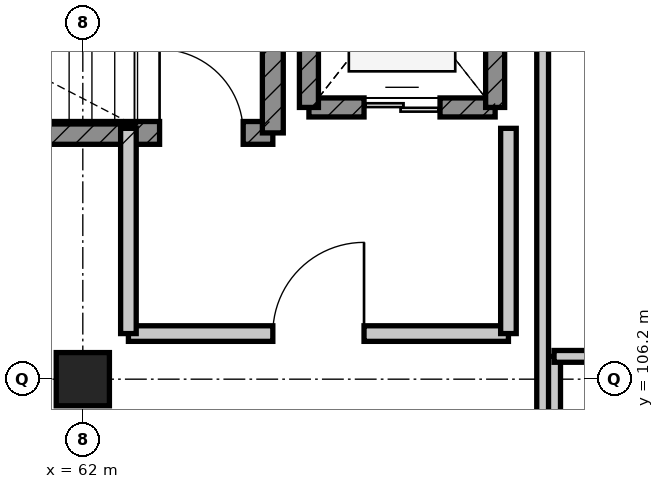
"""IFC4 building model, lengths in metres.
Left out: names, types, materials, properties, quantities, classifications, styles, units other than length and angle.
Written with IfcOpenShell. Run it as: python <this file> out.ifc"""

import sys

from ifc_helpers import new_model, si_unit, direction, frame, frame_2d, origin, origin_2d, place, context, subcontext, project, spatial, rectangle, extrude, element, fill, save


model = new_model("IFC4")
c1 = context("Model", 3, precision=1e-05, world=origin(), true_north=direction((0.0, 1.0)))
c2 = subcontext(c1, "Body", "Model", "MODEL_VIEW")
j1 = project(units=[si_unit("LENGTHUNIT", "METRE"), si_unit("PLANEANGLEUNIT", "RADIAN")], contexts=[c1])
p1 = place(None, origin())
s1 = spatial("IfcSite", under=j1, at=p1, CompositionType="ELEMENT")
p2 = place(p1, origin())
s2 = spatial("IfcBuilding", under=s1, at=p2, CompositionType="ELEMENT")
p3 = place(p2, frame((0.0, 0.0, 15.0)))
s3 = spatial("IfcBuildingStorey", under=s2, at=p3, CompositionType="ELEMENT", Elevation=15.0)
p4 = place(p3, frame((62.0, 106.2, 0.0), z_axis=(0.0, 0.0, 1.0), x_axis=(1.0, 0.0, 0.0)))
e1 = element("IfcColumn", 1, at=p4, inside=s3, PredefinedType="COLUMN", context=c2, shape_type="SweptSolid", body=[
    extrude(rectangle(XDim=0.7, YDim=0.7, at=origin_2d()), origin(), (0.0, 0.0, 1.0), 4.2),
])
p5 = place(p3, frame((56.1, 109.44, 0.0), z_axis=(0.0, 0.0, 1.0), x_axis=(1.0, 0.0, 0.0)))
e2 = element("IfcWall", 2, at=p5, inside=s3, PredefinedType="SHEAR", context=c2, shape_type="SweptSolid", body=[
    extrude(rectangle(XDim=8.4, YDim=0.3, at=frame_2d((4.2, 0.0))), origin(), (0.0, 0.0, 1.0), 3.94),
])
p6 = place(p5, frame((6.91, 0.0, 0.0)))
e3 = element("IfcOpeningElement", 3, at=p6, cuts=e2, PredefinedType="OPENING", context=c2, shape_type="SweptSolid", body=[
    extrude(rectangle(XDim=1.1, YDim=2.1, at=frame_2d((0.55, 1.05))), frame((0.0, 0.16, 0.0), z_axis=(0.0, -1.0, 0.0), x_axis=(1.0, 0.0, 0.0)), (0.0, 0.0, 1.0), 0.32),
])
p7 = place(p3, frame((64.5, 109.44, 0.0), z_axis=(0.0, 0.0, 1.0), x_axis=(0.0, 1.0, 0.0)))
e4 = element("IfcWall", 4, at=p7, inside=s3, PredefinedType="SHEAR", context=c2, shape_type="SweptSolid", body=[
    extrude(rectangle(XDim=3.56, YDim=0.275, at=frame_2d((1.78, 0.0))), origin(), (0.0, 0.0, 1.0), 3.94),
])
p8 = place(p3, frame((64.975, 109.775, 0.0), z_axis=(0.0, 0.0, 1.0), x_axis=(1.0, 0.0, 0.0)))
e5 = element("IfcWall", 5, at=p8, inside=s3, PredefinedType="SHEAR", context=c2, shape_type="SweptSolid", body=[
    extrude(rectangle(XDim=2.45, YDim=0.25, at=frame_2d((1.225, 0.0))), origin(), (0.0, 0.0, 1.0), 3.94),
])
p9 = place(p8, frame((0.725, 0.0, 0.0)))
e6 = element("IfcOpeningElement", 6, at=p9, cuts=e5, PredefinedType="OPENING", context=c2, shape_type="SweptSolid", body=[
    extrude(rectangle(XDim=1.0, YDim=2.15, at=frame_2d((0.5, 1.075))), frame((0.0, 0.135, 0.0), z_axis=(0.0, -1.0, 0.0), x_axis=(1.0, 0.0, 0.0)), (0.0, 0.0, 1.0), 0.27),
])
for number, where, z_axis, x_axis in (
    (7, (67.425, 109.775, 0.0), (0.0, 0.0, 1.0), (0.0, 1.0, 0.0)),
    (8, (64.975, 112.825, 0.0), (0.0, 0.0, 1.0), (0.0, -1.0, 0.0)),
):
    element("IfcWall", number, at=place(p3, frame(where, z_axis=z_axis, x_axis=x_axis)), inside=s3, PredefinedType="SHEAR", context=c2, shape_type="SweptSolid", body=[
        extrude(rectangle(XDim=3.05, YDim=0.25, at=frame_2d((1.525, 0.0))), origin(), (0.0, 0.0, 1.0), 3.94),
    ])
p10 = place(p3, frame((62.6, 106.8, 0.0), z_axis=(0.0, 0.0, 1.0), x_axis=(1.0, 0.0, 0.0)))
e9 = element("IfcWall", 9, at=p10, inside=s3, PredefinedType="PARTITIONING", context=c2, shape_type="SweptSolid", body=[
    extrude(rectangle(XDim=5.0, YDim=0.205, at=frame_2d((2.5, 0.0))), origin(), (0.0, 0.0, 1.0), 3.94),
])
p11 = place(p10, frame((1.9, 0.0, 0.0)))
e10 = element("IfcOpeningElement", 10, at=p11, cuts=e9, PredefinedType="OPENING", context=c2, shape_type="SweptSolid", body=[
    extrude(rectangle(XDim=1.2, YDim=2.1, at=frame_2d((0.6, 1.05))), frame((0.0, 0.113, 0.0), z_axis=(0.0, -1.0, 0.0), x_axis=(1.0, 0.0, 0.0)), (0.0, 0.0, 1.0), 0.225),
])
for number, where, z_axis, x_axis in (
    (11, (67.6, 106.8, 0.0), (0.0, 0.0, 1.0), (0.0, 1.0, 0.0)),
    (12, (62.6, 109.5, 0.0), (0.0, 0.0, 1.0), (0.0, -1.0, 0.0)),
):
    element("IfcWall", number, at=place(p3, frame(where, z_axis=z_axis, x_axis=x_axis)), inside=s3, PredefinedType="PARTITIONING", context=c2, shape_type="SweptSolid", body=[
        extrude(rectangle(XDim=2.7, YDim=0.205, at=frame_2d((1.35, 0.0))), origin(), (0.0, 0.0, 1.0), 3.94),
    ])
p12 = place(p3, frame((68.2, 104.0, 0.0), z_axis=(0.0, 0.0, 1.0), x_axis=(0.0, 1.0, 0.0)))
e13 = element("IfcWall", 13, at=p12, inside=s3, PredefinedType="PARTITIONING", context=c2, shape_type="SweptSolid", body=[
    extrude(rectangle(XDim=2.5, YDim=0.17, at=frame_2d((1.25, 0.0))), origin(), (0.0, 0.0, 1.0), 3.325),
])
p13 = place(p3, frame((68.2, 106.5, 0.0), z_axis=(0.0, 0.0, 1.0), x_axis=(1.0, 0.0, 0.0)))
e14 = element("IfcWall", 14, at=p13, inside=s3, PredefinedType="PARTITIONING", context=c2, shape_type="SweptSolid", body=[
    extrude(rectangle(XDim=2.2, YDim=0.155, at=frame_2d((1.1, 0.0))), origin(), (0.0, 0.0, 1.0), 3.275),
])
p14 = place(p3, frame((68.05, 104.0, 0.0), z_axis=(0.0, 0.0, 1.0), x_axis=(0.0, 1.0, 0.0)))
e15 = element("IfcWall", 15, at=p14, inside=s3, PredefinedType="PARTITIONING", context=c2, shape_type="SweptSolid", body=[
    extrude(rectangle(XDim=11.049, YDim=0.155, at=frame_2d((5.524, 0.0))), origin(), (0.0, 0.0, 1.0), 3.325),
])
p15 = place(p6, origin())
e16 = element("IfcDoor", 16, at=p15, inside=s3, OperationType="SINGLE_SWING_LEFT", PredefinedType="DOOR", context=c2, shape_type="SweptSolid", body=[
    extrude(rectangle(XDim=1.1, YDim=2.1, at=frame_2d((0.55, 1.05))), frame((0.0, 0.025, 0.0), z_axis=(0.0, -1.0, 0.0), x_axis=(1.0, 0.0, 0.0)), (0.0, 0.0, 1.0), 0.05),
])
fill(e3, e16)
p16 = place(p9, origin())
e17 = element("IfcDoor", 17, at=p16, inside=s3, OperationType="DOUBLE_DOOR_SLIDING", PredefinedType="DOOR", context=c2, shape_type="SweptSolid", body=[
    extrude(rectangle(XDim=1.0, YDim=2.15, at=frame_2d((0.5, 1.075))), frame((0.0, 0.025, 0.0), z_axis=(0.0, -1.0, 0.0), x_axis=(1.0, 0.0, 0.0)), (0.0, 0.0, 1.0), 0.05),
])
fill(e6, e17)
p17 = place(p11, origin())
e18 = element("IfcDoor", 18, at=p17, inside=s3, OperationType="SINGLE_SWING_RIGHT", PredefinedType="DOOR", context=c2, shape_type="SweptSolid", body=[
    extrude(rectangle(XDim=1.2, YDim=2.1, at=frame_2d((0.6, 1.05))), frame((0.0, 0.025, 0.0), z_axis=(0.0, -1.0, 0.0), x_axis=(1.0, 0.0, 0.0)), (0.0, 0.0, 1.0), 0.05),
])
fill(e10, e18)
save(model, sys.argv[1])
